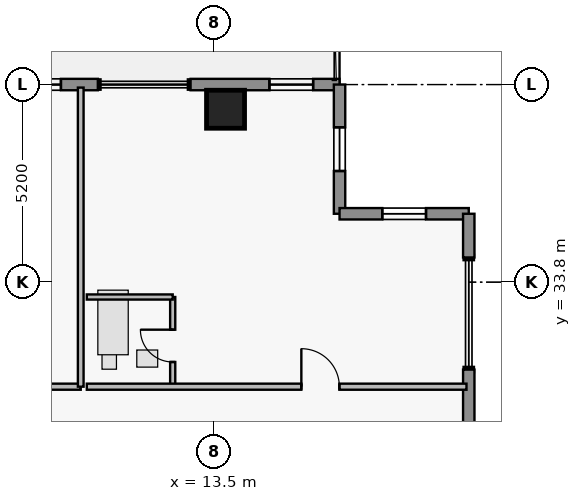
"""IFC4 building model, lengths in metres.
Left out: names, types, materials, properties, quantities, classifications, styles, units other than length and angle.
Written with IfcOpenShell. Run it as: python <this file> out.ifc"""

import sys

from ifc_helpers import new_model, si_unit, direction, frame, frame_2d, origin, origin_2d, place, context, subcontext, project, spatial, rectangle, extrude, element, fill, save


model = new_model("IFC4")
c1 = context("Model", 3, precision=1e-05, world=origin(), true_north=direction((0.0, 1.0)))
c2 = subcontext(c1, "Body", "Model", "MODEL_VIEW")
j1 = project(units=[si_unit("LENGTHUNIT", "METRE"), si_unit("PLANEANGLEUNIT", "RADIAN")], contexts=[c1])
p1 = place(None, origin())
s1 = spatial("IfcSite", under=j1, at=p1, CompositionType="ELEMENT")
p2 = place(p1, origin())
s2 = spatial("IfcBuilding", under=s1, at=p2, CompositionType="ELEMENT")
p3 = place(p2, frame((0.0, 0.0, 254.45)))
s3 = spatial("IfcBuildingStorey", under=s2, at=p3, CompositionType="ELEMENT", Elevation=254.45)
p4 = place(p3, frame((13.8, 38.35, 0.0), z_axis=(0.0, 0.0, 1.0), x_axis=(1.0, 0.0, 0.0)))
e1 = element("IfcColumn", 1, at=p4, inside=s3, PredefinedType="COLUMN", context=c2, shape_type="SweptSolid", body=[
    extrude(rectangle(XDim=1.0, YDim=1.0, at=origin_2d()), origin(), (0.0, 0.0, 1.0), 3.7),
])
p5 = place(p3, frame((3.68, 39.0, 0.0), z_axis=(0.0, 0.0, 1.0), x_axis=(1.0, 0.0, 0.0)))
e2 = element("IfcWall", 2, at=p5, inside=s3, PredefinedType="STANDARD", context=c2, shape_type="SweptSolid", body=[
    extrude(rectangle(XDim=6.76, YDim=0.3, at=frame_2d((3.38, 0.0))), origin(), (0.0, 0.0, 1.0), 3.48),
])
p6 = place(p5, frame((2.638, 0.0, 0.0)))
e3 = element("IfcOpeningElement", 3, at=p6, cuts=e2, PredefinedType="OPENING", context=c2, shape_type="SweptSolid", body=[
    extrude(rectangle(XDim=1.35, YDim=2.3, at=frame_2d((0.675, 1.15))), frame((0.0, 0.16, 0.0), z_axis=(0.0, -1.0, 0.0), x_axis=(1.0, 0.0, 0.0)), (0.0, 0.0, 1.0), 0.32),
])
p7 = place(p5, frame((4.639, 0.0, 0.95)))
e4 = element("IfcOpeningElement", 4, at=p7, cuts=e2, PredefinedType="OPENING", context=c2, shape_type="SweptSolid", body=[
    extrude(rectangle(XDim=1.15, YDim=1.55, at=frame_2d((0.575, 0.775))), frame((0.0, 0.16, 0.0), z_axis=(0.0, -1.0, 0.0), x_axis=(1.0, 0.0, 0.0)), (0.0, 0.0, 1.0), 0.32),
])
p8 = place(p3, frame((12.88, 39.0, 0.0), z_axis=(0.0, 0.0, 1.0), x_axis=(1.0, 0.0, 0.0)))
e5 = element("IfcWall", 5, at=p8, inside=s3, PredefinedType="STANDARD", context=c2, shape_type="SweptSolid", body=[
    extrude(rectangle(XDim=3.92, YDim=0.3, at=frame_2d((1.96, 0.0))), origin(), (0.0, 0.0, 1.0), 3.48),
])
p9 = place(p8, frame((2.075, 0.0, 0.95)))
e6 = element("IfcOpeningElement", 6, at=p9, cuts=e5, PredefinedType="OPENING", context=c2, shape_type="SweptSolid", body=[
    extrude(rectangle(XDim=1.15, YDim=1.55, at=frame_2d((0.575, 0.775))), frame((0.0, 0.16, 0.0), z_axis=(0.0, -1.0, 0.0), x_axis=(1.0, 0.0, 0.0)), (0.0, 0.0, 1.0), 0.32),
])
p10 = place(p3, frame((16.8, 39.0, 0.0), z_axis=(0.0, 0.0, 1.0), x_axis=(0.0, -1.0, 0.0)))
e7 = element("IfcWall", 7, at=p10, inside=s3, PredefinedType="STANDARD", context=c2, shape_type="SweptSolid", body=[
    extrude(rectangle(XDim=3.4, YDim=0.3, at=frame_2d((1.7, 0.0))), origin(), (0.0, 0.0, 1.0), 3.48),
])
p11 = place(p10, frame((1.125, 0.0, 1.25)))
e8 = element("IfcOpeningElement", 8, at=p11, cuts=e7, PredefinedType="OPENING", context=c2, shape_type="SweptSolid", body=[
    extrude(rectangle(XDim=1.15, YDim=1.55, at=frame_2d((0.575, 0.775))), frame((0.0, 0.16, 0.0), z_axis=(0.0, -1.0, 0.0), x_axis=(1.0, 0.0, 0.0)), (0.0, 0.0, 1.0), 0.32),
])
p12 = place(p3, frame((16.8, 35.6, 0.0), z_axis=(0.0, 0.0, 1.0), x_axis=(1.0, 0.0, 0.0)))
e9 = element("IfcWall", 9, at=p12, inside=s3, PredefinedType="STANDARD", context=c2, shape_type="SweptSolid", body=[
    extrude(rectangle(XDim=3.4, YDim=0.3, at=frame_2d((1.7, 0.0))), origin(), (0.0, 0.0, 1.0), 3.48),
])
p13 = place(p12, frame((1.125, 0.0, 1.25)))
e10 = element("IfcOpeningElement", 10, at=p13, cuts=e9, PredefinedType="OPENING", context=c2, shape_type="SweptSolid", body=[
    extrude(rectangle(XDim=1.15, YDim=1.55, at=frame_2d((0.575, 0.775))), frame((0.0, 0.16, 0.0), z_axis=(0.0, -1.0, 0.0), x_axis=(1.0, 0.0, 0.0)), (0.0, 0.0, 1.0), 0.32),
])
p14 = place(p3, frame((20.2, 35.6, 0.0), z_axis=(0.0, 0.0, 1.0), x_axis=(0.0, -1.0, 0.0)))
e11 = element("IfcWall", 11, at=p14, inside=s3, PredefinedType="STANDARD", context=c2, shape_type="SweptSolid", body=[
    extrude(rectangle(XDim=1.15, YDim=0.3, at=frame_2d((0.575, 0.0))), origin(), (0.0, 0.0, 1.0), 3.48),
])
p15 = place(p3, frame((20.2, 31.5, 0.0), z_axis=(0.0, 0.0, 1.0), x_axis=(0.0, -1.0, 0.0)))
e12 = element("IfcWall", 12, at=p15, inside=s3, PredefinedType="STANDARD", context=c2, shape_type="SweptSolid", body=[
    extrude(rectangle(XDim=2.57, YDim=0.3, at=frame_2d((1.285, 0.0))), origin(), (0.0, 0.0, 1.0), 3.48),
])
p16 = place(p3, frame((0.0, 31.05, 0.0), z_axis=(0.0, 0.0, 1.0), x_axis=(1.0, 0.0, 0.0)))
e13 = element("IfcWall", 13, at=p16, inside=s3, PredefinedType="PARTITIONING", context=c2, shape_type="SweptSolid", body=[
    extrude(rectangle(XDim=9.99, YDim=0.16, at=frame_2d((4.995, 0.0))), origin(), (0.0, 0.0, 1.0), 3.48),
])
p17 = place(p16, frame((5.645, 0.0, 0.0)))
e14 = element("IfcOpeningElement", 14, at=p17, cuts=e13, PredefinedType="OPENING", context=c2, shape_type="SweptSolid", body=[
    extrude(rectangle(XDim=1.0, YDim=2.15, at=frame_2d((0.5, 1.075))), frame((0.0, 0.09, 0.0), z_axis=(0.0, -1.0, 0.0), x_axis=(1.0, 0.0, 0.0)), (0.0, 0.0, 1.0), 0.18),
])
p18 = place(p3, frame((12.41, 31.05, 0.0), z_axis=(0.0, 0.0, 1.0), x_axis=(0.0, 1.0, 0.0)))
e15 = element("IfcWall", 15, at=p18, inside=s3, PredefinedType="PLUMBINGWALL", context=c2, shape_type="SweptSolid", body=[
    extrude(rectangle(XDim=2.36, YDim=0.135, at=frame_2d((1.18, 0.0))), origin(), (0.0, 0.0, 1.0), 3.48),
])
p19 = place(p18, frame((0.65, 0.0, 0.0)))
e16 = element("IfcOpeningElement", 16, at=p19, cuts=e15, PredefinedType="OPENING", context=c2, shape_type="SweptSolid", body=[
    extrude(rectangle(XDim=0.85, YDim=2.1, at=frame_2d((0.425, 1.05))), frame((0.0, 0.077, 0.0), z_axis=(0.0, -1.0, 0.0), x_axis=(1.0, 0.0, 0.0)), (0.0, 0.0, 1.0), 0.155),
])
p20 = place(p3, frame((10.15, 31.05, 0.0), z_axis=(0.0, 0.0, 1.0), x_axis=(1.0, 0.0, 0.0)))
e17 = element("IfcWall", 17, at=p20, inside=s3, PredefinedType="PARTITIONING", context=c2, shape_type="SweptSolid", body=[
    extrude(rectangle(XDim=9.99, YDim=0.16, at=frame_2d((4.995, 0.0))), origin(), (0.0, 0.0, 1.0), 3.48),
])
p21 = place(p20, frame((5.645, 0.0, 0.0)))
e18 = element("IfcOpeningElement", 18, at=p21, cuts=e17, PredefinedType="OPENING", context=c2, shape_type="SweptSolid", body=[
    extrude(rectangle(XDim=1.0, YDim=2.15, at=frame_2d((0.5, 1.075))), frame((0.0, 0.09, 0.0), z_axis=(0.0, -1.0, 0.0), x_axis=(1.0, 0.0, 0.0)), (0.0, 0.0, 1.0), 0.18),
])
p22 = place(p3, frame((9.99, 31.05, 0.0), z_axis=(0.0, 0.0, 1.0), x_axis=(0.0, 1.0, 0.0)))
e19 = element("IfcWall", 19, at=p22, inside=s3, PredefinedType="PARTITIONING", context=c2, shape_type="SweptSolid", body=[
    extrude(rectangle(XDim=7.87, YDim=0.15, at=frame_2d((3.935, 0.0))), origin(), (0.0, 0.0, 1.0), 3.48),
])
p23 = place(p3, frame((10.15, 33.41, 0.0), z_axis=(0.0, 0.0, 1.0), x_axis=(1.0, 0.0, 0.0)))
e20 = element("IfcWall", 20, at=p23, inside=s3, PredefinedType="PLUMBINGWALL", context=c2, shape_type="SweptSolid", body=[
    extrude(rectangle(XDim=2.26, YDim=0.135, at=frame_2d((1.13, 0.0))), origin(), (0.0, 0.0, 1.0), 3.076),
])
p24 = place(p7, origin())
e21 = element("IfcWindow", 21, at=p24, inside=s3, PartitioningType="SINGLE_PANEL", PredefinedType="WINDOW", context=c2, shape_type="SweptSolid", body=[
    extrude(rectangle(XDim=1.15, YDim=1.55, at=frame_2d((0.575, 0.775))), frame((0.0, 0.03, 0.0), z_axis=(0.0, -1.0, 0.0), x_axis=(1.0, 0.0, 0.0)), (0.0, 0.0, 1.0), 0.06),
])
fill(e4, e21)
p25 = place(p9, origin())
e22 = element("IfcWindow", 22, at=p25, inside=s3, PartitioningType="SINGLE_PANEL", PredefinedType="WINDOW", context=c2, shape_type="SweptSolid", body=[
    extrude(rectangle(XDim=1.15, YDim=1.55, at=frame_2d((0.575, 0.775))), frame((0.0, 0.03, 0.0), z_axis=(0.0, -1.0, 0.0), x_axis=(1.0, 0.0, 0.0)), (0.0, 0.0, 1.0), 0.06),
])
fill(e6, e22)
p26 = place(p11, origin())
e23 = element("IfcWindow", 23, at=p26, inside=s3, PartitioningType="SINGLE_PANEL", PredefinedType="WINDOW", context=c2, shape_type="SweptSolid", body=[
    extrude(rectangle(XDim=1.15, YDim=1.55, at=frame_2d((0.575, 0.775))), frame((0.0, 0.03, 0.0), z_axis=(0.0, -1.0, 0.0), x_axis=(1.0, 0.0, 0.0)), (0.0, 0.0, 1.0), 0.06),
])
fill(e8, e23)
p27 = place(p13, origin())
e24 = element("IfcWindow", 24, at=p27, inside=s3, PartitioningType="SINGLE_PANEL", PredefinedType="WINDOW", context=c2, shape_type="SweptSolid", body=[
    extrude(rectangle(XDim=1.15, YDim=1.55, at=frame_2d((0.575, 0.775))), frame((0.0, 0.03, 0.0), z_axis=(0.0, -1.0, 0.0), x_axis=(1.0, 0.0, 0.0)), (0.0, 0.0, 1.0), 0.06),
])
fill(e10, e24)
p28 = place(p19, origin())
e25 = element("IfcDoor", 25, at=p28, inside=s3, OperationType="SINGLE_SWING_RIGHT", PredefinedType="DOOR", context=c2, shape_type="SweptSolid", body=[
    extrude(rectangle(XDim=0.85, YDim=2.1, at=frame_2d((0.425, 1.05))), frame((0.0, 0.025, 0.0), z_axis=(0.0, -1.0, 0.0), x_axis=(1.0, 0.0, 0.0)), (0.0, 0.0, 1.0), 0.05),
])
fill(e16, e25)
p29 = place(p21, origin())
e26 = element("IfcDoor", 26, at=p29, inside=s3, OperationType="SINGLE_SWING_LEFT", PredefinedType="DOOR", context=c2, shape_type="SweptSolid", body=[
    extrude(rectangle(XDim=1.0, YDim=2.15, at=frame_2d((0.5, 1.075))), frame((0.0, 0.025, 0.0), z_axis=(0.0, -1.0, 0.0), x_axis=(1.0, 0.0, 0.0)), (0.0, 0.0, 1.0), 0.05),
])
fill(e18, e26)
save(model, sys.argv[1])
